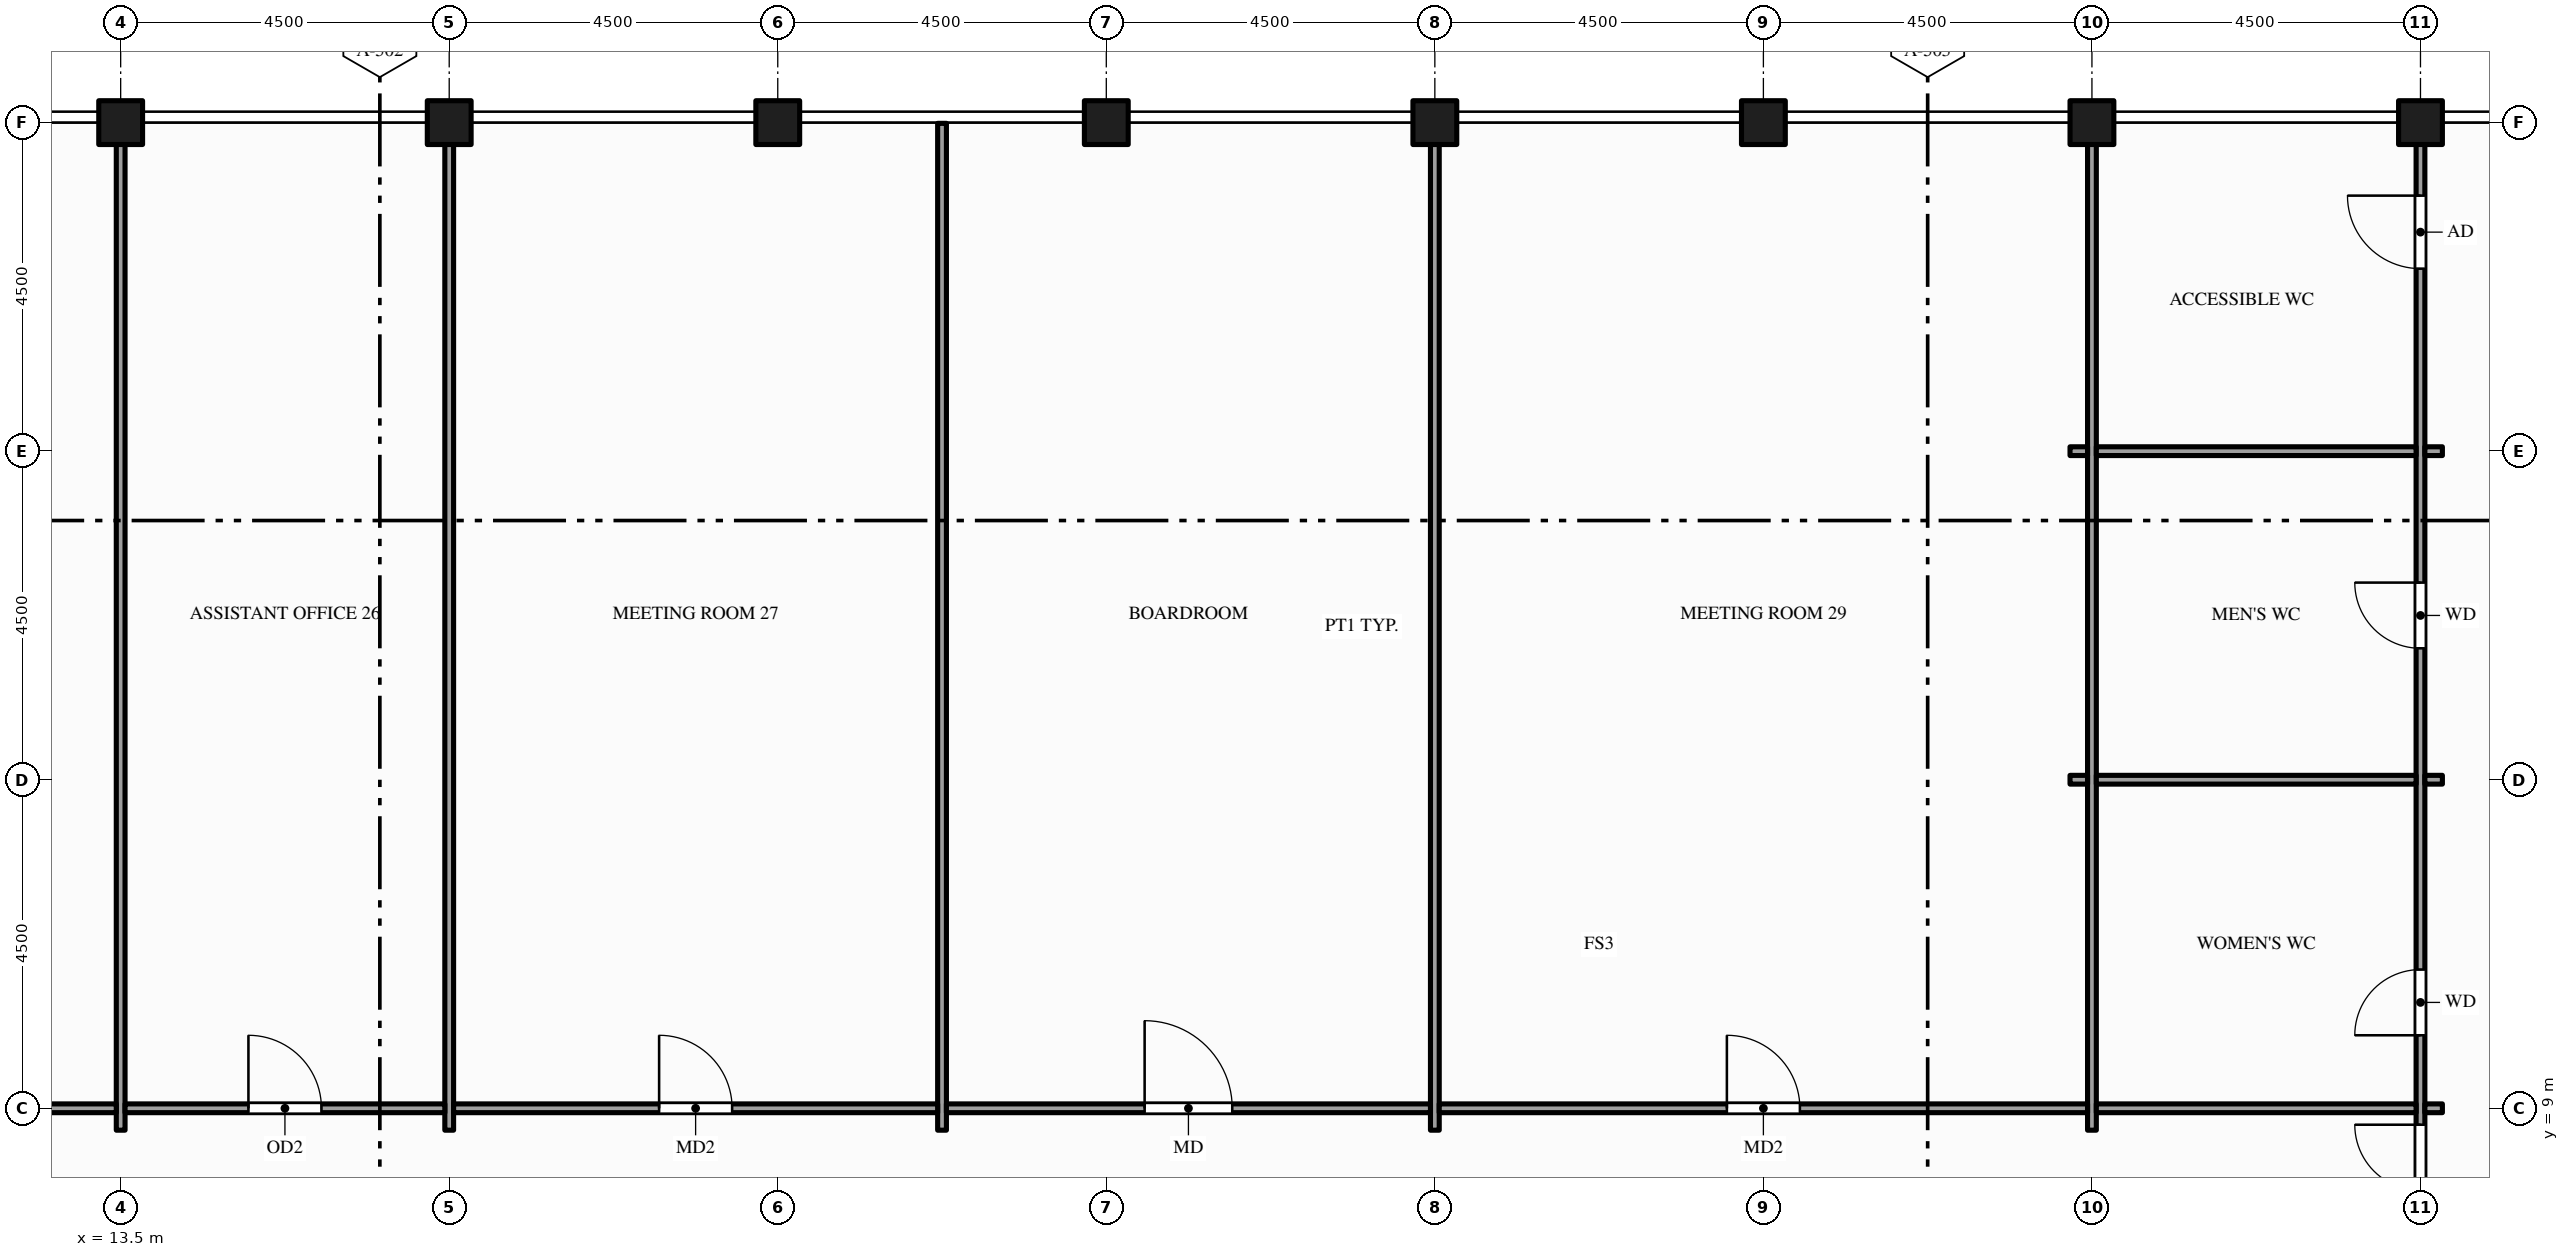
"""IFC4 building model, lengths in metres.
Left out: names, types, materials, properties, quantities, classifications, styles, units other than length and angle.
Written with IfcOpenShell. Run it as: python <this file> out.ifc"""

import sys

from ifc_helpers import new_model, si_unit, direction, frame, frame_2d, origin, origin_2d, place, context, subcontext, project, spatial, rectangle, hollow_rectangle, extrude, element, fill, save


model = new_model("IFC4")
c1 = context("Model", 3, precision=1e-05, world=origin(), true_north=direction((0.0, 1.0)))
c2 = subcontext(c1, "Body", "Model", "MODEL_VIEW")
j1 = project(units=[si_unit("LENGTHUNIT", "METRE"), si_unit("PLANEANGLEUNIT", "RADIAN")], contexts=[c1])
p1 = place(None, origin())
s1 = spatial("IfcSite", under=j1, at=p1, CompositionType="ELEMENT")
p2 = place(p1, origin())
s2 = spatial("IfcBuilding", under=s1, at=p2, CompositionType="ELEMENT")
p3 = place(p2, frame((0.0, 0.0, 336.5)))
s3 = spatial("IfcBuildingStorey", under=s2, at=p3, CompositionType="ELEMENT", Elevation=336.5)
for number, where, z_axis, x_axis in (
    (1, (13.5, 22.5, -0.15), (0.0, 0.0, 1.0), (1.0, 0.0, 0.0)),
    (2, (18.0, 22.5, -0.15), (0.0, 0.0, 1.0), (1.0, 0.0, 0.0)),
    (3, (22.5, 22.5, -0.15), (0.0, 0.0, 1.0), (1.0, 0.0, 0.0)),
    (4, (27.0, 22.5, -0.15), (0.0, 0.0, 1.0), (1.0, 0.0, 0.0)),
    (5, (31.5, 22.5, -0.15), (0.0, 0.0, 1.0), (1.0, 0.0, 0.0)),
    (6, (36.0, 22.5, -0.15), (0.0, 0.0, 1.0), (1.0, 0.0, 0.0)),
    (7, (40.5, 22.5, -0.15), (0.0, 0.0, 1.0), (1.0, 0.0, 0.0)),
    (8, (45.0, 22.5, -0.15), (0.0, 0.0, 1.0), (1.0, 0.0, 0.0)),
):
    element("IfcColumn", number, at=place(p3, frame(where, z_axis=z_axis, x_axis=x_axis)), inside=s3, PredefinedType="COLUMN", context=c2, shape_type="SweptSolid", body=[
        extrude(hollow_rectangle(XDim=0.6, YDim=0.6, WallThickness=0.03, at=origin_2d()), origin(), (0.0, 0.0, 1.0), 4.5),
    ])
for number, where, z_axis, x_axis in (
    (9, (13.5, 8.7, 0.0), (0.0, 0.0, 1.0), (0.0, 1.0, 0.0)),
    (10, (18.0, 8.7, 0.0), (0.0, 0.0, 1.0), (0.0, 1.0, 0.0)),
    (11, (24.75, 8.7, 0.0), (0.0, 0.0, 1.0), (0.0, 1.0, 0.0)),
    (12, (31.5, 8.7, 0.0), (0.0, 0.0, 1.0), (0.0, 1.0, 0.0)),
    (13, (40.5, 8.7, 0.0), (0.0, 0.0, 1.0), (0.0, 1.0, 0.0)),
):
    element("IfcWall", number, at=place(p3, frame(where, z_axis=z_axis, x_axis=x_axis)), inside=s3, PredefinedType="PARTITIONING", context=c2, shape_type="SweptSolid", body=[
        extrude(rectangle(XDim=13.79, YDim=0.12, at=frame_2d((6.895, 0.0))), origin(), (0.0, 0.0, 1.0), 3.359),
    ])
p4 = place(p3, frame((45.0, 0.01, 0.0), z_axis=(0.0, 0.0, 1.0), x_axis=(0.0, 1.0, 0.0)))
e14 = element("IfcWall", 14, at=p4, inside=s3, PredefinedType="PARTITIONING", context=c2, shape_type="SweptSolid", body=[
    extrude(rectangle(XDim=22.48, YDim=0.12, at=frame_2d((11.24, 0.0))), origin(), (0.0, 0.0, 1.0), 3.359),
])
p5 = place(p4, frame((6.965, 0.0, 0.0)))
e15 = element("IfcOpeningElement", 15, at=p5, cuts=e14, PredefinedType="OPENING", context=c2, shape_type="SweptSolid", body=[
    extrude(rectangle(XDim=1.8, YDim=2.1, at=frame_2d((0.9, 1.05))), frame((0.0, 0.07, 0.0), z_axis=(0.0, -1.0, 0.0), x_axis=(1.0, 0.0, 0.0)), (0.0, 0.0, 1.0), 0.14),
])
p6 = place(p4, frame((9.99, 0.0, 0.0)))
e16 = element("IfcOpeningElement", 16, at=p6, cuts=e14, PredefinedType="OPENING", context=c2, shape_type="SweptSolid", body=[
    extrude(rectangle(XDim=0.9, YDim=2.1, at=frame_2d((0.45, 1.05))), frame((0.0, 0.07, 0.0), z_axis=(0.0, -1.0, 0.0), x_axis=(1.0, 0.0, 0.0)), (0.0, 0.0, 1.0), 0.14),
])
p7 = place(p4, frame((15.29, 0.0, 0.0)))
e17 = element("IfcOpeningElement", 17, at=p7, cuts=e14, PredefinedType="OPENING", context=c2, shape_type="SweptSolid", body=[
    extrude(rectangle(XDim=0.9, YDim=2.1, at=frame_2d((0.45, 1.05))), frame((0.0, 0.07, 0.0), z_axis=(0.0, -1.0, 0.0), x_axis=(1.0, 0.0, 0.0)), (0.0, 0.0, 1.0), 0.14),
])
p8 = place(p4, frame((20.49, 0.0, 0.0)))
e18 = element("IfcOpeningElement", 18, at=p8, cuts=e14, PredefinedType="OPENING", context=c2, shape_type="SweptSolid", body=[
    extrude(rectangle(XDim=1.0, YDim=2.1, at=frame_2d((0.5, 1.05))), frame((0.0, 0.07, 0.0), z_axis=(0.0, -1.0, 0.0), x_axis=(1.0, 0.0, 0.0)), (0.0, 0.0, 1.0), 0.14),
])
p9 = place(p3, frame((0.01, 9.0, 0.0), z_axis=(0.0, 0.0, 1.0), x_axis=(1.0, 0.0, 0.0)))
e19 = element("IfcWall", 19, at=p9, inside=s3, PredefinedType="PARTITIONING", context=c2, shape_type="SweptSolid", body=[
    extrude(rectangle(XDim=13.43, YDim=0.12, at=frame_2d((6.715, 0.0))), origin(), (0.0, 0.0, 1.0), 3.359),
])
p10 = place(p9, frame((6.225, 0.0, 0.0)))
e20 = element("IfcOpeningElement", 20, at=p10, cuts=e19, PredefinedType="OPENING", context=c2, shape_type="SweptSolid", body=[
    extrude(rectangle(XDim=1.0, YDim=2.1, at=frame_2d((0.5, 1.05))), frame((0.0, 0.07, 0.0), z_axis=(0.0, -1.0, 0.0), x_axis=(1.0, 0.0, 0.0)), (0.0, 0.0, 1.0), 0.14),
])
p11 = place(p3, frame((13.56, 9.0, 0.0), z_axis=(0.0, 0.0, 1.0), x_axis=(1.0, 0.0, 0.0)))
e21 = element("IfcWall", 21, at=p11, inside=s3, PredefinedType="PARTITIONING", context=c2, shape_type="SweptSolid", body=[
    extrude(rectangle(XDim=4.38, YDim=0.12, at=frame_2d((2.19, 0.0))), origin(), (0.0, 0.0, 1.0), 3.359),
])
p12 = place(p11, frame((1.69, 0.0, 0.0)))
e22 = element("IfcOpeningElement", 22, at=p12, cuts=e21, PredefinedType="OPENING", context=c2, shape_type="SweptSolid", body=[
    extrude(rectangle(XDim=1.0, YDim=2.1, at=frame_2d((0.5, 1.05))), frame((0.0, 0.07, 0.0), z_axis=(0.0, -1.0, 0.0), x_axis=(1.0, 0.0, 0.0)), (0.0, 0.0, 1.0), 0.14),
])
p13 = place(p3, frame((18.06, 9.0, 0.0), z_axis=(0.0, 0.0, 1.0), x_axis=(1.0, 0.0, 0.0)))
e23 = element("IfcWall", 23, at=p13, inside=s3, PredefinedType="PARTITIONING", context=c2, shape_type="SweptSolid", body=[
    extrude(rectangle(XDim=6.63, YDim=0.12, at=frame_2d((3.315, 0.0))), origin(), (0.0, 0.0, 1.0), 3.359),
])
p14 = place(p13, frame((2.815, 0.0, 0.0)))
e24 = element("IfcOpeningElement", 24, at=p14, cuts=e23, PredefinedType="OPENING", context=c2, shape_type="SweptSolid", body=[
    extrude(rectangle(XDim=1.0, YDim=2.1, at=frame_2d((0.5, 1.05))), frame((0.0, 0.07, 0.0), z_axis=(0.0, -1.0, 0.0), x_axis=(1.0, 0.0, 0.0)), (0.0, 0.0, 1.0), 0.14),
])
p15 = place(p3, frame((24.81, 9.0, 0.0), z_axis=(0.0, 0.0, 1.0), x_axis=(1.0, 0.0, 0.0)))
e25 = element("IfcWall", 25, at=p15, inside=s3, PredefinedType="PARTITIONING", context=c2, shape_type="SweptSolid", body=[
    extrude(rectangle(XDim=6.63, YDim=0.12, at=frame_2d((3.315, 0.0))), origin(), (0.0, 0.0, 1.0), 3.359),
])
p16 = place(p15, frame((2.715, 0.0, 0.0)))
e26 = element("IfcOpeningElement", 26, at=p16, cuts=e25, PredefinedType="OPENING", context=c2, shape_type="SweptSolid", body=[
    extrude(rectangle(XDim=1.2, YDim=2.1, at=frame_2d((0.6, 1.05))), frame((0.0, 0.07, 0.0), z_axis=(0.0, -1.0, 0.0), x_axis=(1.0, 0.0, 0.0)), (0.0, 0.0, 1.0), 0.14),
])
p17 = place(p3, frame((31.56, 9.0, 0.0), z_axis=(0.0, 0.0, 1.0), x_axis=(1.0, 0.0, 0.0)))
e27 = element("IfcWall", 27, at=p17, inside=s3, PredefinedType="PARTITIONING", context=c2, shape_type="SweptSolid", body=[
    extrude(rectangle(XDim=8.88, YDim=0.12, at=frame_2d((4.44, 0.0))), origin(), (0.0, 0.0, 1.0), 3.359),
])
p18 = place(p17, frame((3.94, 0.0, 0.0)))
e28 = element("IfcOpeningElement", 28, at=p18, cuts=e27, PredefinedType="OPENING", context=c2, shape_type="SweptSolid", body=[
    extrude(rectangle(XDim=1.0, YDim=2.1, at=frame_2d((0.5, 1.05))), frame((0.0, 0.07, 0.0), z_axis=(0.0, -1.0, 0.0), x_axis=(1.0, 0.0, 0.0)), (0.0, 0.0, 1.0), 0.14),
])
p19 = place(p3, frame((40.56, 9.0, 0.0), z_axis=(0.0, 0.0, 1.0), x_axis=(1.0, 0.0, 0.0)))
e29 = element("IfcWall", 29, at=p19, inside=s3, PredefinedType="PARTITIONING", context=c2, shape_type="SweptSolid", body=[
    extrude(rectangle(XDim=4.38, YDim=0.12, at=frame_2d((2.19, 0.0))), origin(), (0.0, 0.0, 1.0), 3.359),
])
for number, where, z_axis, x_axis in (
    (30, (45.06, 9.0, 0.0), (0.0, 0.0, 1.0), (1.0, 0.0, 0.0)),
    (31, (40.2, 13.5, 0.0), (0.0, 0.0, 1.0), (1.0, 0.0, 0.0)),
):
    element("IfcWall", number, at=place(p3, frame(where, z_axis=z_axis, x_axis=x_axis)), inside=s3, PredefinedType="PARTITIONING", context=c2, shape_type="SweptSolid", body=[
        extrude(rectangle(XDim=0.24, YDim=0.12, at=frame_2d((0.12, 0.0))), origin(), (0.0, 0.0, 1.0), 3.359),
    ])
p20 = place(p3, frame((40.56, 13.5, 0.0), z_axis=(0.0, 0.0, 1.0), x_axis=(1.0, 0.0, 0.0)))
e32 = element("IfcWall", 32, at=p20, inside=s3, PredefinedType="PARTITIONING", context=c2, shape_type="SweptSolid", body=[
    extrude(rectangle(XDim=4.38, YDim=0.12, at=frame_2d((2.19, 0.0))), origin(), (0.0, 0.0, 1.0), 3.359),
])
for number, where, z_axis, x_axis in (
    (33, (45.06, 13.5, 0.0), (0.0, 0.0, 1.0), (1.0, 0.0, 0.0)),
    (34, (40.2, 18.0, 0.0), (0.0, 0.0, 1.0), (1.0, 0.0, 0.0)),
):
    element("IfcWall", number, at=place(p3, frame(where, z_axis=z_axis, x_axis=x_axis)), inside=s3, PredefinedType="PARTITIONING", context=c2, shape_type="SweptSolid", body=[
        extrude(rectangle(XDim=0.24, YDim=0.12, at=frame_2d((0.12, 0.0))), origin(), (0.0, 0.0, 1.0), 3.359),
    ])
p21 = place(p3, frame((40.56, 18.0, 0.0), z_axis=(0.0, 0.0, 1.0), x_axis=(1.0, 0.0, 0.0)))
e35 = element("IfcWall", 35, at=p21, inside=s3, PredefinedType="PARTITIONING", context=c2, shape_type="SweptSolid", body=[
    extrude(rectangle(XDim=4.38, YDim=0.12, at=frame_2d((2.19, 0.0))), origin(), (0.0, 0.0, 1.0), 3.359),
])
p22 = place(p3, frame((45.06, 18.0, 0.0), z_axis=(0.0, 0.0, 1.0), x_axis=(1.0, 0.0, 0.0)))
e36 = element("IfcWall", 36, at=p22, inside=s3, PredefinedType="PARTITIONING", context=c2, shape_type="SweptSolid", body=[
    extrude(rectangle(XDim=0.24, YDim=0.12, at=frame_2d((0.12, 0.0))), origin(), (0.0, 0.0, 1.0), 3.359),
])
p23 = place(p5, origin())
e37 = element("IfcDoor", 37, at=p23, inside=s3, OperationType="DOUBLE_DOOR_SINGLE_SWING", PredefinedType="DOOR", context=c2, shape_type="SweptSolid", body=[
    extrude(rectangle(XDim=1.8, YDim=2.1, at=frame_2d((0.9, 1.05))), frame((0.0, 0.025, 0.0), z_axis=(0.0, -1.0, 0.0), x_axis=(1.0, 0.0, 0.0)), (0.0, 0.0, 1.0), 0.05),
])
fill(e15, e37)
p24 = place(p12, origin())
e38 = element("IfcDoor", 38, at=p24, inside=s3, OperationType="SINGLE_SWING_LEFT", PredefinedType="DOOR", context=c2, shape_type="SweptSolid", body=[
    extrude(rectangle(XDim=1.0, YDim=2.1, at=frame_2d((0.5, 1.05))), frame((0.0, 0.025, 0.0), z_axis=(0.0, -1.0, 0.0), x_axis=(1.0, 0.0, 0.0)), (0.0, 0.0, 1.0), 0.05),
])
fill(e22, e38)
p25 = place(p14, origin())
e39 = element("IfcDoor", 39, at=p25, inside=s3, OperationType="SINGLE_SWING_LEFT", PredefinedType="DOOR", context=c2, shape_type="SweptSolid", body=[
    extrude(rectangle(XDim=1.0, YDim=2.1, at=frame_2d((0.5, 1.05))), frame((0.0, 0.025, 0.0), z_axis=(0.0, -1.0, 0.0), x_axis=(1.0, 0.0, 0.0)), (0.0, 0.0, 1.0), 0.05),
])
fill(e24, e39)
p26 = place(p16, origin())
e40 = element("IfcDoor", 40, at=p26, inside=s3, OperationType="SINGLE_SWING_LEFT", PredefinedType="DOOR", context=c2, shape_type="SweptSolid", body=[
    extrude(rectangle(XDim=1.2, YDim=2.1, at=frame_2d((0.6, 1.05))), frame((0.0, 0.025, 0.0), z_axis=(0.0, -1.0, 0.0), x_axis=(1.0, 0.0, 0.0)), (0.0, 0.0, 1.0), 0.05),
])
fill(e26, e40)
p27 = place(p18, origin())
e41 = element("IfcDoor", 41, at=p27, inside=s3, OperationType="SINGLE_SWING_LEFT", PredefinedType="DOOR", context=c2, shape_type="SweptSolid", body=[
    extrude(rectangle(XDim=1.0, YDim=2.1, at=frame_2d((0.5, 1.05))), frame((0.0, 0.025, 0.0), z_axis=(0.0, -1.0, 0.0), x_axis=(1.0, 0.0, 0.0)), (0.0, 0.0, 1.0), 0.05),
])
fill(e28, e41)
p28 = place(p6, origin())
e42 = element("IfcDoor", 42, at=p28, inside=s3, OperationType="SINGLE_SWING_LEFT", PredefinedType="DOOR", context=c2, shape_type="SweptSolid", body=[
    extrude(rectangle(XDim=0.9, YDim=2.1, at=frame_2d((0.45, 1.05))), frame((0.0, 0.025, 0.0), z_axis=(0.0, -1.0, 0.0), x_axis=(1.0, 0.0, 0.0)), (0.0, 0.0, 1.0), 0.05),
])
fill(e16, e42)
p29 = place(p7, origin())
e43 = element("IfcDoor", 43, at=p29, inside=s3, OperationType="SINGLE_SWING_RIGHT", PredefinedType="DOOR", context=c2, shape_type="SweptSolid", body=[
    extrude(rectangle(XDim=0.9, YDim=2.1, at=frame_2d((0.45, 1.05))), frame((0.0, 0.025, 0.0), z_axis=(0.0, -1.0, 0.0), x_axis=(1.0, 0.0, 0.0)), (0.0, 0.0, 1.0), 0.05),
])
fill(e17, e43)
p30 = place(p8, origin())
e44 = element("IfcDoor", 44, at=p30, inside=s3, OperationType="SINGLE_SWING_RIGHT", PredefinedType="DOOR", context=c2, shape_type="SweptSolid", body=[
    extrude(rectangle(XDim=1.0, YDim=2.1, at=frame_2d((0.5, 1.05))), frame((0.0, 0.025, 0.0), z_axis=(0.0, -1.0, 0.0), x_axis=(1.0, 0.0, 0.0)), (0.0, 0.0, 1.0), 0.05),
])
fill(e18, e44)
save(model, sys.argv[1])
